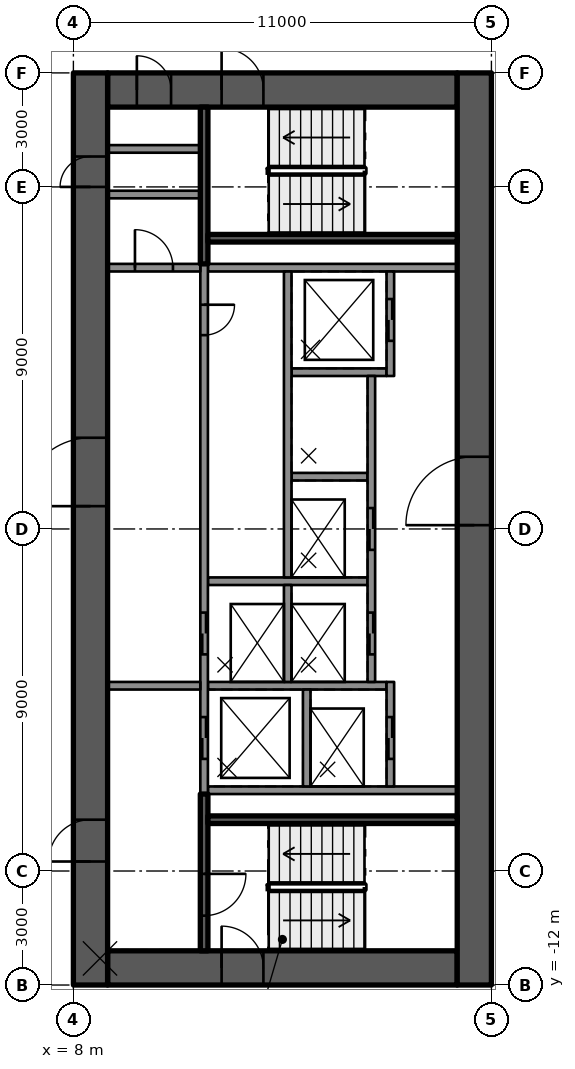
"""IFC4 building model, lengths in metres.
Left out: names, types, materials, properties, quantities, classifications, styles, units other than length and angle.
Written with IfcOpenShell. Run it as: python <this file> out.ifc"""

import sys

from ifc_helpers import new_model, si_unit, direction, frame, frame_2d, origin, place, context, subcontext, project, spatial, rectangle, extrude, element, fill, save


model = new_model("IFC4")
c1 = context("Model", 3, precision=1e-05, world=origin(), true_north=direction((0.0, 1.0)))
c2 = subcontext(c1, "Body", "Model", "MODEL_VIEW")
j1 = project(units=[si_unit("LENGTHUNIT", "METRE"), si_unit("PLANEANGLEUNIT", "RADIAN")], contexts=[c1])
p1 = place(None, origin())
s1 = spatial("IfcSite", under=j1, at=p1, CompositionType="ELEMENT")
p2 = place(p1, origin())
s2 = spatial("IfcBuilding", under=s1, at=p2, CompositionType="ELEMENT")
p3 = place(p2, frame((0.0, 0.0, 170.6)))
s3 = spatial("IfcBuildingStorey", under=s2, at=p3, CompositionType="ELEMENT", Elevation=170.6)
p4 = place(p3, frame((8.9, 11.55, 0.0), z_axis=(0.0, 0.0, 1.0), x_axis=(1.0, 0.0, 0.0)))
e1 = element("IfcWall", 1, at=p4, inside=s3, PredefinedType="SHEAR", context=c2, shape_type="SweptSolid", body=[
    extrude(rectangle(XDim=9.2, YDim=0.9, at=frame_2d((4.6, 0.0))), origin(), (0.0, 0.0, 1.0), 3.5),
])
p5 = place(p4, frame((3.0, 0.0, 0.0)))
e2 = element("IfcOpeningElement", 2, at=p5, cuts=e1, PredefinedType="OPENING", context=c2, shape_type="SweptSolid", body=[
    extrude(rectangle(XDim=1.1, YDim=2.1, at=frame_2d((0.55, 1.05))), frame((0.0, 0.46, 0.0), z_axis=(0.0, -1.0, 0.0), x_axis=(1.0, 0.0, 0.0)), (0.0, 0.0, 1.0), 0.92),
])
p6 = place(p4, frame((0.77, 0.0, 0.0)))
e3 = element("IfcOpeningElement", 3, at=p6, cuts=e1, PredefinedType="OPENING", context=c2, shape_type="SweptSolid", body=[
    extrude(rectangle(XDim=0.9, YDim=2.1, at=frame_2d((0.45, 1.05))), frame((0.0, 0.46, 0.0), z_axis=(0.0, -1.0, 0.0), x_axis=(1.0, 0.0, 0.0)), (0.0, 0.0, 1.0), 0.92),
])
p7 = place(p3, frame((8.9, -11.55, 0.0), z_axis=(0.0, 0.0, 1.0), x_axis=(1.0, 0.0, 0.0)))
e4 = element("IfcWall", 4, at=p7, inside=s3, PredefinedType="SHEAR", context=c2, shape_type="SweptSolid", body=[
    extrude(rectangle(XDim=9.2, YDim=0.9, at=frame_2d((4.6, 0.0))), origin(), (0.0, 0.0, 1.0), 3.5),
])
p8 = place(p7, frame((3.0, 0.0, 0.0)))
e5 = element("IfcOpeningElement", 5, at=p8, cuts=e4, PredefinedType="OPENING", context=c2, shape_type="SweptSolid", body=[
    extrude(rectangle(XDim=1.1, YDim=2.1, at=frame_2d((0.55, 1.05))), frame((0.0, 0.46, 0.0), z_axis=(0.0, -1.0, 0.0), x_axis=(1.0, 0.0, 0.0)), (0.0, 0.0, 1.0), 0.92),
])
p9 = place(p3, frame((8.45, -12.0, 0.0), z_axis=(0.0, 0.0, 1.0), x_axis=(0.0, 1.0, 0.0)))
e6 = element("IfcWall", 6, at=p9, inside=s3, PredefinedType="SHEAR", context=c2, shape_type="SweptSolid", body=[
    extrude(rectangle(XDim=24.0, YDim=0.9, at=frame_2d((12.0, 0.0))), origin(), (0.0, 0.0, 1.0), 3.5),
])
p10 = place(p9, frame((12.6, 0.0, 0.0)))
e7 = element("IfcOpeningElement", 7, at=p10, cuts=e6, PredefinedType="OPENING", context=c2, shape_type="SweptSolid", body=[
    extrude(rectangle(XDim=1.8, YDim=2.1, at=frame_2d((0.9, 1.05))), frame((0.0, 0.46, 0.0), z_axis=(0.0, -1.0, 0.0), x_axis=(1.0, 0.0, 0.0)), (0.0, 0.0, 1.0), 0.92),
])
p11 = place(p9, frame((3.25, 0.0, 0.0)))
e8 = element("IfcOpeningElement", 8, at=p11, cuts=e6, PredefinedType="OPENING", context=c2, shape_type="SweptSolid", body=[
    extrude(rectangle(XDim=1.1, YDim=2.1, at=frame_2d((0.55, 1.05))), frame((0.0, 0.46, 0.0), z_axis=(0.0, -1.0, 0.0), x_axis=(1.0, 0.0, 0.0)), (0.0, 0.0, 1.0), 0.92),
])
p12 = place(p9, frame((21.0, 0.0, 0.0)))
e9 = element("IfcOpeningElement", 9, at=p12, cuts=e6, PredefinedType="OPENING", context=c2, shape_type="SweptSolid", body=[
    extrude(rectangle(XDim=0.8, YDim=2.1, at=frame_2d((0.4, 1.05))), frame((0.0, 0.46, 0.0), z_axis=(0.0, -1.0, 0.0), x_axis=(1.0, 0.0, 0.0)), (0.0, 0.0, 1.0), 0.92),
])
p13 = place(p3, frame((18.55, -12.0, 0.0), z_axis=(0.0, 0.0, 1.0), x_axis=(0.0, 1.0, 0.0)))
e10 = element("IfcWall", 10, at=p13, inside=s3, PredefinedType="SHEAR", context=c2, shape_type="SweptSolid", body=[
    extrude(rectangle(XDim=24.0, YDim=0.9, at=frame_2d((12.0, 0.0))), origin(), (0.0, 0.0, 1.0), 3.5),
])
p14 = place(p13, frame((12.1, 0.0, 0.0)))
e11 = element("IfcOpeningElement", 11, at=p14, cuts=e10, PredefinedType="OPENING", context=c2, shape_type="SweptSolid", body=[
    extrude(rectangle(XDim=1.8, YDim=2.1, at=frame_2d((0.9, 1.05))), frame((0.0, 0.46, 0.0), z_axis=(0.0, -1.0, 0.0), x_axis=(1.0, 0.0, 0.0)), (0.0, 0.0, 1.0), 0.92),
])
for number, where, z_axis, x_axis in (
    (12, (11.54, -6.875, 0.0), (0.0, 0.0, 1.0), (1.0, 0.0, 0.0)),
    (13, (11.54, 6.875, 0.0), (0.0, 0.0, 1.0), (1.0, 0.0, 0.0)),
):
    element("IfcWall", number, at=place(p3, frame(where, z_axis=z_axis, x_axis=x_axis)), inside=s3, PredefinedType="SOLIDWALL", context=c2, shape_type="SweptSolid", body=[
        extrude(rectangle(XDim=6.56, YDim=0.2, at=frame_2d((3.28, 0.0))), origin(), (0.0, 0.0, 1.0), 3.08),
    ])
p15 = place(p3, frame((13.74, 4.125, 0.0), z_axis=(0.0, 0.0, 1.0), x_axis=(1.0, 0.0, 0.0)))
e14 = element("IfcWall", 14, at=p15, inside=s3, PredefinedType="SOLIDWALL", context=c2, shape_type="SweptSolid", body=[
    extrude(rectangle(XDim=2.5, YDim=0.2, at=frame_2d((1.25, 0.0))), origin(), (0.0, 0.0, 1.0), 3.08),
])
p16 = place(p3, frame((13.74, 1.375, 0.0), z_axis=(0.0, 0.0, 1.0), x_axis=(1.0, 0.0, 0.0)))
e15 = element("IfcWall", 15, at=p16, inside=s3, PredefinedType="SOLIDWALL", context=c2, shape_type="SweptSolid", body=[
    extrude(rectangle(XDim=2.0, YDim=0.2, at=frame_2d((1.0, 0.0))), origin(), (0.0, 0.0, 1.0), 3.08),
])
p17 = place(p3, frame((11.54, -1.375, 0.0), z_axis=(0.0, 0.0, 1.0), x_axis=(1.0, 0.0, 0.0)))
e16 = element("IfcWall", 16, at=p17, inside=s3, PredefinedType="SOLIDWALL", context=c2, shape_type="SweptSolid", body=[
    extrude(rectangle(XDim=4.2, YDim=0.2, at=frame_2d((2.1, 0.0))), origin(), (0.0, 0.0, 1.0), 3.08),
])
p18 = place(p3, frame((11.54, -4.125, 0.0), z_axis=(0.0, 0.0, 1.0), x_axis=(1.0, 0.0, 0.0)))
e17 = element("IfcWall", 17, at=p18, inside=s3, PredefinedType="SOLIDWALL", context=c2, shape_type="SweptSolid", body=[
    extrude(rectangle(XDim=4.7, YDim=0.2, at=frame_2d((2.35, 0.0))), origin(), (0.0, 0.0, 1.0), 3.08),
])
p19 = place(p3, frame((11.44, 6.975, 0.0), z_axis=(0.0, 0.0, 1.0), x_axis=(0.0, -1.0, 0.0)))
e18 = element("IfcWall", 18, at=p19, inside=s3, PredefinedType="SOLIDWALL", context=c2, shape_type="SweptSolid", body=[
    extrude(rectangle(XDim=13.95, YDim=0.2, at=frame_2d((6.975, 0.0))), origin(), (0.0, 0.0, 1.0), 3.08),
])
p20 = place(p19, frame((9.175, 0.0, 0.0)))
e19 = element("IfcOpeningElement", 19, at=p20, cuts=e18, PredefinedType="OPENING", context=c2, shape_type="SweptSolid", body=[
    extrude(rectangle(XDim=1.1, YDim=2.1, at=frame_2d((0.55, 1.05))), frame((0.0, 0.11, 0.0), z_axis=(0.0, -1.0, 0.0), x_axis=(1.0, 0.0, 0.0)), (0.0, 0.0, 1.0), 0.22),
])
p21 = place(p19, frame((11.925, 0.0, 0.0)))
e20 = element("IfcOpeningElement", 20, at=p21, cuts=e18, PredefinedType="OPENING", context=c2, shape_type="SweptSolid", body=[
    extrude(rectangle(XDim=1.1, YDim=2.1, at=frame_2d((0.55, 1.05))), frame((0.0, 0.11, 0.0), z_axis=(0.0, -1.0, 0.0), x_axis=(1.0, 0.0, 0.0)), (0.0, 0.0, 1.0), 0.22),
])
p22 = place(p19, frame((1.075, 0.0, 0.0)))
e21 = element("IfcOpeningElement", 21, at=p22, cuts=e18, PredefinedType="OPENING", context=c2, shape_type="SweptSolid", body=[
    extrude(rectangle(XDim=0.8, YDim=2.1, at=frame_2d((0.4, 1.05))), frame((0.0, 0.11, 0.0), z_axis=(0.0, -1.0, 0.0), x_axis=(1.0, 0.0, 0.0)), (0.0, 0.0, 1.0), 0.22),
])
p23 = place(p3, frame((13.64, 6.775, 0.0), z_axis=(0.0, 0.0, 1.0), x_axis=(0.0, -1.0, 0.0)))
e22 = element("IfcWall", 22, at=p23, inside=s3, PredefinedType="SOLIDWALL", context=c2, shape_type="SweptSolid", body=[
    extrude(rectangle(XDim=8.05, YDim=0.2, at=frame_2d((4.025, 0.0))), origin(), (0.0, 0.0, 1.0), 3.08),
])
for number, where, z_axis, x_axis in (
    (23, (13.64, -1.475, 0.0), (0.0, 0.0, 1.0), (0.0, -1.0, 0.0)),
    (24, (14.14, -4.225, 0.0), (0.0, 0.0, 1.0), (0.0, -1.0, 0.0)),
):
    element("IfcWall", number, at=place(p3, frame(where, z_axis=z_axis, x_axis=x_axis)), inside=s3, PredefinedType="SOLIDWALL", context=c2, shape_type="SweptSolid", body=[
        extrude(rectangle(XDim=2.55, YDim=0.2, at=frame_2d((1.275, 0.0))), origin(), (0.0, 0.0, 1.0), 3.08),
    ])
p24 = place(p3, frame((16.34, 6.775, 0.0), z_axis=(0.0, 0.0, 1.0), x_axis=(0.0, -1.0, 0.0)))
e25 = element("IfcWall", 25, at=p24, inside=s3, PredefinedType="SOLIDWALL", context=c2, shape_type="SweptSolid", body=[
    extrude(rectangle(XDim=2.75, YDim=0.2, at=frame_2d((1.375, 0.0))), origin(), (0.0, 0.0, 1.0), 3.08),
])
p25 = place(p24, frame((0.725, 0.0, 0.0)))
e26 = element("IfcOpeningElement", 26, at=p25, cuts=e25, PredefinedType="OPENING", context=c2, shape_type="SweptSolid", body=[
    extrude(rectangle(XDim=1.1, YDim=2.1, at=frame_2d((0.55, 1.05))), frame((0.0, 0.11, 0.0), z_axis=(0.0, -1.0, 0.0), x_axis=(1.0, 0.0, 0.0)), (0.0, 0.0, 1.0), 0.22),
])
p26 = place(p3, frame((15.84, 4.025, 0.0), z_axis=(0.0, 0.0, 1.0), x_axis=(0.0, -1.0, 0.0)))
e27 = element("IfcWall", 27, at=p26, inside=s3, PredefinedType="SOLIDWALL", context=c2, shape_type="SweptSolid", body=[
    extrude(rectangle(XDim=8.05, YDim=0.2, at=frame_2d((4.025, 0.0))), origin(), (0.0, 0.0, 1.0), 3.08),
])
p27 = place(p26, frame((3.475, 0.0, 0.0)))
e28 = element("IfcOpeningElement", 28, at=p27, cuts=e27, PredefinedType="OPENING", context=c2, shape_type="SweptSolid", body=[
    extrude(rectangle(XDim=1.1, YDim=2.1, at=frame_2d((0.55, 1.05))), frame((0.0, 0.11, 0.0), z_axis=(0.0, -1.0, 0.0), x_axis=(1.0, 0.0, 0.0)), (0.0, 0.0, 1.0), 0.22),
])
p28 = place(p26, frame((6.225, 0.0, 0.0)))
e29 = element("IfcOpeningElement", 29, at=p28, cuts=e27, PredefinedType="OPENING", context=c2, shape_type="SweptSolid", body=[
    extrude(rectangle(XDim=1.1, YDim=2.1, at=frame_2d((0.55, 1.05))), frame((0.0, 0.11, 0.0), z_axis=(0.0, -1.0, 0.0), x_axis=(1.0, 0.0, 0.0)), (0.0, 0.0, 1.0), 0.22),
])
p29 = place(p3, frame((16.34, -4.025, 0.0), z_axis=(0.0, 0.0, 1.0), x_axis=(0.0, -1.0, 0.0)))
e30 = element("IfcWall", 30, at=p29, inside=s3, PredefinedType="SOLIDWALL", context=c2, shape_type="SweptSolid", body=[
    extrude(rectangle(XDim=2.75, YDim=0.2, at=frame_2d((1.375, 0.0))), origin(), (0.0, 0.0, 1.0), 3.08),
])
p30 = place(p29, frame((0.925, 0.0, 0.0)))
e31 = element("IfcOpeningElement", 31, at=p30, cuts=e30, PredefinedType="OPENING", context=c2, shape_type="SweptSolid", body=[
    extrude(rectangle(XDim=1.1, YDim=2.1, at=frame_2d((0.55, 1.05))), frame((0.0, 0.11, 0.0), z_axis=(0.0, -1.0, 0.0), x_axis=(1.0, 0.0, 0.0)), (0.0, 0.0, 1.0), 0.22),
])
p31 = place(p3, frame((11.44, -6.975, 0.0), z_axis=(0.0, 0.0, 1.0), x_axis=(0.0, -1.0, 0.0)))
e32 = element("IfcWall", 32, at=p31, inside=s3, PredefinedType="SOLIDWALL", context=c2, shape_type="SweptSolid", body=[
    extrude(rectangle(XDim=4.125, YDim=0.2, at=frame_2d((2.062, 0.0))), origin(), (0.0, 0.0, 1.0), 3.08),
])
p32 = place(p31, frame((2.1, 0.0, 0.0)))
e33 = element("IfcOpeningElement", 33, at=p32, cuts=e32, PredefinedType="OPENING", context=c2, shape_type="SweptSolid", body=[
    extrude(rectangle(XDim=1.1, YDim=2.1, at=frame_2d((0.55, 1.05))), frame((0.0, 0.11, 0.0), z_axis=(0.0, -1.0, 0.0), x_axis=(1.0, 0.0, 0.0)), (0.0, 0.0, 1.0), 0.22),
])
p33 = place(p3, frame((11.54, -7.65, 0.0), z_axis=(0.0, 0.0, 1.0), x_axis=(1.0, 0.0, 0.0)))
e34 = element("IfcWall", 34, at=p33, inside=s3, PredefinedType="SOLIDWALL", context=c2, shape_type="SweptSolid", body=[
    extrude(rectangle(XDim=6.56, YDim=0.2, at=frame_2d((3.28, 0.0))), origin(), (0.0, 0.0, 1.0), 3.08),
])
p34 = place(p3, frame((11.44, 11.1, 0.0), z_axis=(0.0, 0.0, 1.0), x_axis=(0.0, -1.0, 0.0)))
e35 = element("IfcWall", 35, at=p34, inside=s3, PredefinedType="SOLIDWALL", context=c2, shape_type="SweptSolid", body=[
    extrude(rectangle(XDim=4.125, YDim=0.2, at=frame_2d((2.062, 0.0))), origin(), (0.0, 0.0, 1.0), 3.08),
])
p35 = place(p3, frame((11.54, 7.65, 0.0), z_axis=(0.0, 0.0, 1.0), x_axis=(1.0, 0.0, 0.0)))
e36 = element("IfcWall", 36, at=p35, inside=s3, PredefinedType="SOLIDWALL", context=c2, shape_type="SweptSolid", body=[
    extrude(rectangle(XDim=6.56, YDim=0.2, at=frame_2d((3.28, 0.0))), origin(), (0.0, 0.0, 1.0), 3.08),
])
p36 = place(p3, frame((8.9, -4.125, 0.0), z_axis=(0.0, 0.0, 1.0), x_axis=(1.0, 0.0, 0.0)))
e37 = element("IfcWall", 37, at=p36, inside=s3, PredefinedType="PARTITIONING", context=c2, shape_type="SweptSolid", body=[
    extrude(rectangle(XDim=2.44, YDim=0.2, at=frame_2d((1.22, 0.0))), origin(), (0.0, 0.0, 1.0), 3.08),
])
p37 = place(p3, frame((8.9, 6.875, 0.0), z_axis=(0.0, 0.0, 1.0), x_axis=(1.0, 0.0, 0.0)))
e38 = element("IfcWall", 38, at=p37, inside=s3, PredefinedType="PARTITIONING", context=c2, shape_type="SweptSolid", body=[
    extrude(rectangle(XDim=2.44, YDim=0.2, at=frame_2d((1.22, 0.0))), origin(), (0.0, 0.0, 1.0), 3.08),
])
p38 = place(p37, frame((0.72, 0.0, 0.0)))
e39 = element("IfcOpeningElement", 39, at=p38, cuts=e38, PredefinedType="OPENING", context=c2, shape_type="SweptSolid", body=[
    extrude(rectangle(XDim=1.0, YDim=2.1, at=frame_2d((0.5, 1.05))), frame((0.0, 0.11, 0.0), z_axis=(0.0, -1.0, 0.0), x_axis=(1.0, 0.0, 0.0)), (0.0, 0.0, 1.0), 0.22),
])
for number, where, z_axis, x_axis in (
    (40, (8.9, 10.0, 0.0), (0.0, 0.0, 1.0), (1.0, 0.0, 0.0)),
    (41, (8.9, 8.8, 0.0), (0.0, 0.0, 1.0), (1.0, 0.0, 0.0)),
):
    element("IfcWall", number, at=place(p3, frame(where, z_axis=z_axis, x_axis=x_axis)), inside=s3, PredefinedType="PARTITIONING", context=c2, shape_type="SweptSolid", body=[
        extrude(rectangle(XDim=2.44, YDim=0.2, at=frame_2d((1.22, 0.0))), origin(), (0.0, 0.0, 1.0), 3.08),
    ])
p39 = place(p25, origin())
e42 = element("IfcDoor", 42, at=p39, inside=s3, OperationType="DOUBLE_DOOR_SLIDING", PredefinedType="DOOR", context=c2, shape_type="SweptSolid", body=[
    extrude(rectangle(XDim=1.1, YDim=2.1, at=frame_2d((0.55, 1.05))), frame((0.0, 0.025, 0.0), z_axis=(0.0, -1.0, 0.0), x_axis=(1.0, 0.0, 0.0)), (0.0, 0.0, 1.0), 0.05),
])
fill(e26, e42)
p40 = place(p27, origin())
e43 = element("IfcDoor", 43, at=p40, inside=s3, OperationType="DOUBLE_DOOR_SLIDING", PredefinedType="DOOR", context=c2, shape_type="SweptSolid", body=[
    extrude(rectangle(XDim=1.1, YDim=2.1, at=frame_2d((0.55, 1.05))), frame((0.0, 0.025, 0.0), z_axis=(0.0, -1.0, 0.0), x_axis=(1.0, 0.0, 0.0)), (0.0, 0.0, 1.0), 0.05),
])
fill(e28, e43)
p41 = place(p20, origin())
e44 = element("IfcDoor", 44, at=p41, inside=s3, OperationType="DOUBLE_DOOR_SLIDING", PredefinedType="DOOR", context=c2, shape_type="SweptSolid", body=[
    extrude(rectangle(XDim=1.1, YDim=2.1, at=frame_2d((0.55, 1.05))), frame((0.0, 0.025, 0.0), z_axis=(0.0, -1.0, 0.0), x_axis=(1.0, 0.0, 0.0)), (0.0, 0.0, 1.0), 0.05),
])
fill(e19, e44)
p42 = place(p28, origin())
e45 = element("IfcDoor", 45, at=p42, inside=s3, OperationType="DOUBLE_DOOR_SLIDING", PredefinedType="DOOR", context=c2, shape_type="SweptSolid", body=[
    extrude(rectangle(XDim=1.1, YDim=2.1, at=frame_2d((0.55, 1.05))), frame((0.0, 0.025, 0.0), z_axis=(0.0, -1.0, 0.0), x_axis=(1.0, 0.0, 0.0)), (0.0, 0.0, 1.0), 0.05),
])
fill(e29, e45)
p43 = place(p21, origin())
e46 = element("IfcDoor", 46, at=p43, inside=s3, OperationType="DOUBLE_DOOR_SLIDING", PredefinedType="DOOR", context=c2, shape_type="SweptSolid", body=[
    extrude(rectangle(XDim=1.1, YDim=2.1, at=frame_2d((0.55, 1.05))), frame((0.0, 0.025, 0.0), z_axis=(0.0, -1.0, 0.0), x_axis=(1.0, 0.0, 0.0)), (0.0, 0.0, 1.0), 0.05),
])
fill(e20, e46)
p44 = place(p30, origin())
e47 = element("IfcDoor", 47, at=p44, inside=s3, OperationType="DOUBLE_DOOR_SLIDING", PredefinedType="DOOR", context=c2, shape_type="SweptSolid", body=[
    extrude(rectangle(XDim=1.1, YDim=2.1, at=frame_2d((0.55, 1.05))), frame((0.0, 0.025, 0.0), z_axis=(0.0, -1.0, 0.0), x_axis=(1.0, 0.0, 0.0)), (0.0, 0.0, 1.0), 0.05),
])
fill(e31, e47)
p45 = place(p22, origin())
e48 = element("IfcDoor", 48, at=p45, inside=s3, OperationType="SINGLE_SWING_LEFT", PredefinedType="DOOR", context=c2, shape_type="SweptSolid", body=[
    extrude(rectangle(XDim=0.8, YDim=2.1, at=frame_2d((0.4, 1.05))), frame((0.0, 0.025, 0.0), z_axis=(0.0, -1.0, 0.0), x_axis=(1.0, 0.0, 0.0)), (0.0, 0.0, 1.0), 0.05),
])
fill(e21, e48)
p46 = place(p10, origin())
e49 = element("IfcDoor", 49, at=p46, inside=s3, OperationType="SINGLE_SWING_RIGHT", PredefinedType="DOOR", context=c2, shape_type="SweptSolid", body=[
    extrude(rectangle(XDim=1.8, YDim=2.1, at=frame_2d((0.9, 1.05))), frame((0.0, 0.025, 0.0), z_axis=(0.0, -1.0, 0.0), x_axis=(1.0, 0.0, 0.0)), (0.0, 0.0, 1.0), 0.05),
])
fill(e7, e49)
p47 = place(p14, origin())
e50 = element("IfcDoor", 50, at=p47, inside=s3, OperationType="SINGLE_SWING_RIGHT", PredefinedType="DOOR", context=c2, shape_type="SweptSolid", body=[
    extrude(rectangle(XDim=1.8, YDim=2.1, at=frame_2d((0.9, 1.05))), frame((0.0, 0.025, 0.0), z_axis=(0.0, -1.0, 0.0), x_axis=(1.0, 0.0, 0.0)), (0.0, 0.0, 1.0), 0.05),
])
fill(e11, e50)
p48 = place(p11, origin())
e51 = element("IfcDoor", 51, at=p48, inside=s3, OperationType="SINGLE_SWING_LEFT", PredefinedType="DOOR", context=c2, shape_type="SweptSolid", body=[
    extrude(rectangle(XDim=1.1, YDim=2.1, at=frame_2d((0.55, 1.05))), frame((0.0, 0.025, 0.0), z_axis=(0.0, -1.0, 0.0), x_axis=(1.0, 0.0, 0.0)), (0.0, 0.0, 1.0), 0.05),
])
fill(e8, e51)
p49 = place(p8, origin())
e52 = element("IfcDoor", 52, at=p49, inside=s3, OperationType="SINGLE_SWING_LEFT", PredefinedType="DOOR", context=c2, shape_type="SweptSolid", body=[
    extrude(rectangle(XDim=1.1, YDim=2.1, at=frame_2d((0.55, 1.05))), frame((0.0, 0.025, 0.0), z_axis=(0.0, -1.0, 0.0), x_axis=(1.0, 0.0, 0.0)), (0.0, 0.0, 1.0), 0.05),
])
fill(e5, e52)
p50 = place(p5, origin())
e53 = element("IfcDoor", 53, at=p50, inside=s3, OperationType="SINGLE_SWING_LEFT", PredefinedType="DOOR", context=c2, shape_type="SweptSolid", body=[
    extrude(rectangle(XDim=1.1, YDim=2.1, at=frame_2d((0.55, 1.05))), frame((0.0, 0.025, 0.0), z_axis=(0.0, -1.0, 0.0), x_axis=(1.0, 0.0, 0.0)), (0.0, 0.0, 1.0), 0.05),
])
fill(e2, e53)
p51 = place(p32, origin())
e54 = element("IfcDoor", 54, at=p51, inside=s3, OperationType="SINGLE_SWING_RIGHT", PredefinedType="DOOR", context=c2, shape_type="SweptSolid", body=[
    extrude(rectangle(XDim=1.1, YDim=2.1, at=frame_2d((0.55, 1.05))), frame((0.0, 0.025, 0.0), z_axis=(0.0, -1.0, 0.0), x_axis=(1.0, 0.0, 0.0)), (0.0, 0.0, 1.0), 0.05),
])
fill(e33, e54)
p52 = place(p6, origin())
e55 = element("IfcDoor", 55, at=p52, inside=s3, OperationType="SINGLE_SWING_LEFT", PredefinedType="DOOR", context=c2, shape_type="SweptSolid", body=[
    extrude(rectangle(XDim=0.9, YDim=2.1, at=frame_2d((0.45, 1.05))), frame((0.0, 0.025, 0.0), z_axis=(0.0, -1.0, 0.0), x_axis=(1.0, 0.0, 0.0)), (0.0, 0.0, 1.0), 0.05),
])
fill(e3, e55)
p53 = place(p12, origin())
e56 = element("IfcDoor", 56, at=p53, inside=s3, OperationType="SINGLE_SWING_RIGHT", PredefinedType="DOOR", context=c2, shape_type="SweptSolid", body=[
    extrude(rectangle(XDim=0.8, YDim=2.1, at=frame_2d((0.4, 1.05))), frame((0.0, 0.025, 0.0), z_axis=(0.0, -1.0, 0.0), x_axis=(1.0, 0.0, 0.0)), (0.0, 0.0, 1.0), 0.05),
])
fill(e9, e56)
p54 = place(p38, origin())
e57 = element("IfcDoor", 57, at=p54, inside=s3, OperationType="SINGLE_SWING_RIGHT", PredefinedType="DOOR", context=c2, shape_type="SweptSolid", body=[
    extrude(rectangle(XDim=1.0, YDim=2.1, at=frame_2d((0.5, 1.05))), frame((0.0, 0.025, 0.0), z_axis=(0.0, -1.0, 0.0), x_axis=(1.0, 0.0, 0.0)), (0.0, 0.0, 1.0), 0.05),
])
fill(e39, e57)
save(model, sys.argv[1])
